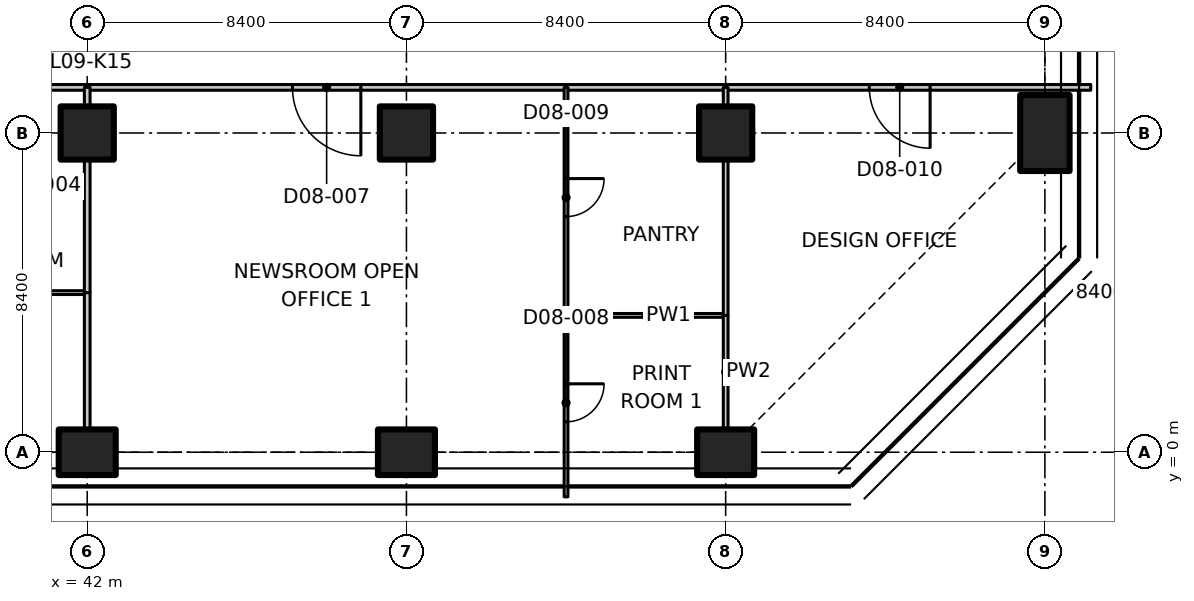
"""IFC4 building model, lengths in metres.
Left out: names, types, materials, properties, quantities, classifications, styles, units other than length and angle.
Written with IfcOpenShell. Run it as: python <this file> out.ifc"""

import sys

from ifc_helpers import new_model, si_unit, direction, frame, frame_2d, origin, origin_2d, place, context, subcontext, project, spatial, polyline, rectangle, outline, extrude, element, fill, save


model = new_model("IFC4")
c1 = context("Model", 3, precision=1e-05, world=origin(), true_north=direction((0.0, 1.0)))
c2 = subcontext(c1, "Body", "Model", "MODEL_VIEW")
j1 = project(units=[si_unit("LENGTHUNIT", "METRE"), si_unit("PLANEANGLEUNIT", "RADIAN")], contexts=[c1])
p1 = place(None, origin())
s1 = spatial("IfcSite", under=j1, at=p1, CompositionType="ELEMENT")
p2 = place(p1, origin())
s2 = spatial("IfcBuilding", under=s1, at=p2, CompositionType="ELEMENT")
p3 = place(p2, frame((0.0, 0.0, 47.3)))
s3 = spatial("IfcBuildingStorey", under=s2, at=p3, CompositionType="ELEMENT", Elevation=47.3)
p4 = place(p3, frame((42.0, 0.0, 0.0), z_axis=(0.0, 0.0, 1.0), x_axis=(0.0, 1.0, 0.0)))
e1 = element("IfcColumn", 1, at=p4, inside=s3, PredefinedType="COLUMN", context=c2, shape_type="SweptSolid", body=[
    extrude(rectangle(XDim=1.2, YDim=1.5, at=origin_2d()), origin(), (0.0, 0.0, 1.0), 3.35),
])
p5 = place(p3, frame((42.0, 8.4, 0.0), z_axis=(0.0, 0.0, 1.0), x_axis=(1.0, 0.0, 0.0)))
e2 = element("IfcColumn", 2, at=p5, inside=s3, PredefinedType="COLUMN", context=c2, shape_type="SweptSolid", body=[
    extrude(rectangle(XDim=1.4, YDim=1.4, at=origin_2d()), origin(), (0.0, 0.0, 1.0), 3.35),
])
p6 = place(p3, frame((50.4, 0.0, 0.0), z_axis=(0.0, 0.0, 1.0), x_axis=(0.0, 1.0, 0.0)))
e3 = element("IfcColumn", 3, at=p6, inside=s3, PredefinedType="COLUMN", context=c2, shape_type="SweptSolid", body=[
    extrude(rectangle(XDim=1.2, YDim=1.5, at=origin_2d()), origin(), (0.0, 0.0, 1.0), 3.35),
])
p7 = place(p3, frame((50.4, 8.4, 0.0), z_axis=(0.0, 0.0, 1.0), x_axis=(1.0, 0.0, 0.0)))
e4 = element("IfcColumn", 4, at=p7, inside=s3, PredefinedType="COLUMN", context=c2, shape_type="SweptSolid", body=[
    extrude(rectangle(XDim=1.4, YDim=1.4, at=origin_2d()), origin(), (0.0, 0.0, 1.0), 3.35),
])
p8 = place(p3, frame((58.8, 0.0, 0.0), z_axis=(0.0, 0.0, 1.0), x_axis=(0.0, 1.0, 0.0)))
e5 = element("IfcColumn", 5, at=p8, inside=s3, PredefinedType="COLUMN", context=c2, shape_type="SweptSolid", body=[
    extrude(rectangle(XDim=1.2, YDim=1.5, at=origin_2d()), origin(), (0.0, 0.0, 1.0), 3.35),
])
p9 = place(p3, frame((58.8, 8.4, 0.0), z_axis=(0.0, 0.0, 1.0), x_axis=(1.0, 0.0, 0.0)))
e6 = element("IfcColumn", 6, at=p9, inside=s3, PredefinedType="COLUMN", context=c2, shape_type="SweptSolid", body=[
    extrude(rectangle(XDim=1.4, YDim=1.4, at=origin_2d()), origin(), (0.0, 0.0, 1.0), 3.35),
])
p10 = place(p3, frame((67.2, 8.4, 0.0), z_axis=(0.0, 0.0, 1.0), x_axis=(1.0, 0.0, 0.0)))
e7 = element("IfcColumn", 7, at=p10, inside=s3, PredefinedType="COLUMN", context=c2, shape_type="SweptSolid", body=[
    extrude(rectangle(XDim=1.3, YDim=2.0, at=origin_2d()), origin(), (0.0, 0.0, 1.0), 3.35),
])
p11 = place(p3, frame((42.0, 9.6, 0.0), z_axis=(0.0, 0.0, 1.0), x_axis=(-1.0, 0.0, 0.0)))
e8 = element("IfcWall", 8, at=p11, inside=s3, PredefinedType="PARTITIONING", context=c2, shape_type="SweptSolid", body=[
    extrude(rectangle(XDim=4.2, YDim=0.15, at=frame_2d((2.1, 0.0))), origin(), (0.0, 0.0, 1.0), 3.33),
])
p12 = place(p3, frame((54.6, 9.6, 0.0), z_axis=(0.0, 0.0, 1.0), x_axis=(-1.0, 0.0, 0.0)))
e9 = element("IfcWall", 9, at=p12, inside=s3, PredefinedType="PARTITIONING", context=c2, shape_type="SweptSolid", body=[
    extrude(rectangle(XDim=12.6, YDim=0.15, at=frame_2d((6.3, 0.0))), origin(), (0.0, 0.0, 1.0), 3.33),
])
p13 = place(p12, frame((5.4, 0.0, 0.0)))
e10 = element("IfcOpeningElement", 10, at=p13, cuts=e9, PredefinedType="OPENING", context=c2, shape_type="SweptSolid", body=[
    extrude(rectangle(XDim=1.8, YDim=2.1, at=frame_2d((0.9, 1.05))), frame((0.0, 0.085, 0.0), z_axis=(0.0, -1.0, 0.0), x_axis=(1.0, 0.0, 0.0)), (0.0, 0.0, 1.0), 0.17),
])
p14 = place(p3, frame((58.8, 9.6, 0.0), z_axis=(0.0, 0.0, 1.0), x_axis=(-1.0, 0.0, 0.0)))
e11 = element("IfcWall", 11, at=p14, inside=s3, PredefinedType="PARTITIONING", context=c2, shape_type="SweptSolid", body=[
    extrude(rectangle(XDim=4.2, YDim=0.15, at=frame_2d((2.1, 0.0))), origin(), (0.0, 0.0, 1.0), 3.33),
])
p15 = place(p3, frame((68.407, 9.6, 0.0), z_axis=(0.0, 0.0, 1.0), x_axis=(-1.0, 0.0, 0.0)))
e12 = element("IfcWall", 12, at=p15, inside=s3, PredefinedType="PARTITIONING", context=c2, shape_type="SweptSolid", body=[
    extrude(outline(polyline([(0.0, 0.0), (9.607, 0.0), (9.607, 3.33), (1.657, 3.33), (1.655, 2.98), (0.759, 2.98), (0.757, 3.33), (0.127, 3.33), (0.0, 3.33), (0.0, 0.0)])), frame((0.0, 0.075, 0.0), z_axis=(0.0, -1.0, 0.0), x_axis=(1.0, 0.0, 0.0)), (0.0, 0.0, 1.0), 0.15),
])
p16 = place(p15, frame((4.227, 0.0, 0.0)))
e13 = element("IfcOpeningElement", 13, at=p16, cuts=e12, PredefinedType="OPENING", context=c2, shape_type="SweptSolid", body=[
    extrude(rectangle(XDim=1.6, YDim=2.1, at=frame_2d((0.8, 1.05))), frame((0.0, 0.085, 0.0), z_axis=(0.0, -1.0, 0.0), x_axis=(1.0, 0.0, 0.0)), (0.0, 0.0, 1.0), 0.17),
])
p17 = place(p3, frame((37.8, 4.2, 0.0), z_axis=(0.0, 0.0, 1.0), x_axis=(1.0, 0.0, 0.0)))
e14 = element("IfcWall", 14, at=p17, inside=s3, PredefinedType="PARTITIONING", context=c2, shape_type="SweptSolid", body=[
    extrude(rectangle(XDim=4.2, YDim=0.1, at=frame_2d((2.1, 0.0))), origin(), (0.0, 0.0, 1.0), 3.33),
])
p18 = place(p3, frame((42.0, 4.2, 0.0), z_axis=(0.0, 0.0, 1.0), x_axis=(0.0, -1.0, 0.0)))
e15 = element("IfcWall", 15, at=p18, inside=s3, PredefinedType="PARTITIONING", context=c2, shape_type="SweptSolid", body=[
    extrude(rectangle(XDim=3.58, YDim=0.15, at=frame_2d((1.79, 0.0))), origin(), (0.0, 0.0, 1.0), 3.33),
])
p19 = place(p3, frame((42.0, 9.6, 0.0), z_axis=(0.0, 0.0, 1.0), x_axis=(0.0, -1.0, 0.0)))
e16 = element("IfcWall", 16, at=p19, inside=s3, PredefinedType="PARTITIONING", context=c2, shape_type="SweptSolid", body=[
    extrude(rectangle(XDim=0.48, YDim=0.15, at=frame_2d((0.24, 0.0))), origin(), (0.0, 0.0, 1.0), 3.33),
])
p20 = place(p3, frame((42.0, 7.68, 0.0), z_axis=(0.0, 0.0, 1.0), x_axis=(0.0, -1.0, 0.0)))
e17 = element("IfcWall", 17, at=p20, inside=s3, PredefinedType="PARTITIONING", context=c2, shape_type="SweptSolid", body=[
    extrude(rectangle(XDim=3.48, YDim=0.15, at=frame_2d((1.74, 0.0))), origin(), (0.0, 0.0, 1.0), 3.33),
])
p21 = place(p3, frame((54.6, 3.6, 0.0), z_axis=(0.0, 0.0, 1.0), x_axis=(0.0, -1.0, 0.0)))
e18 = element("IfcWall", 18, at=p21, inside=s3, PredefinedType="PARTITIONING", context=c2, shape_type="SweptSolid", body=[
    extrude(outline(polyline([(0.0, 0.0), (4.774, 0.0), (4.774, 3.33), (4.7, 3.33), (4.05, 3.33), (4.048, 2.98), (3.152, 2.98), (3.15, 3.33), (0.0, 3.33), (0.0, 0.0)])), frame((0.0, 0.05, 0.0), z_axis=(0.0, -1.0, 0.0), x_axis=(1.0, 0.0, 0.0)), (0.0, 0.0, 1.0), 0.1),
])
p22 = place(p21, frame((1.8, 0.0, 0.0)))
e19 = element("IfcOpeningElement", 19, at=p22, cuts=e18, PredefinedType="OPENING", context=c2, shape_type="SweptSolid", body=[
    extrude(rectangle(XDim=1.0, YDim=2.1, at=frame_2d((0.5, 1.05))), frame((0.0, 0.06, 0.0), z_axis=(0.0, -1.0, 0.0), x_axis=(1.0, 0.0, 0.0)), (0.0, 0.0, 1.0), 0.12),
])
p23 = place(p3, frame((54.6, 9.6, 0.0), z_axis=(0.0, 0.0, 1.0), x_axis=(0.0, -1.0, 0.0)))
e20 = element("IfcWall", 20, at=p23, inside=s3, PredefinedType="PARTITIONING", context=c2, shape_type="SweptSolid", body=[
    extrude(rectangle(XDim=6.0, YDim=0.1, at=frame_2d((3.0, 0.0))), origin(), (0.0, 0.0, 1.0), 3.33),
])
p24 = place(p23, frame((2.4, 0.0, 0.0)))
e21 = element("IfcOpeningElement", 21, at=p24, cuts=e20, PredefinedType="OPENING", context=c2, shape_type="SweptSolid", body=[
    extrude(rectangle(XDim=1.0, YDim=2.1, at=frame_2d((0.5, 1.05))), frame((0.0, 0.06, 0.0), z_axis=(0.0, -1.0, 0.0), x_axis=(1.0, 0.0, 0.0)), (0.0, 0.0, 1.0), 0.12),
])
p25 = place(p3, frame((54.6, 3.6, 0.0), z_axis=(0.0, 0.0, 1.0), x_axis=(1.0, 0.0, 0.0)))
e22 = element("IfcWall", 22, at=p25, inside=s3, PredefinedType="PARTITIONING", context=c2, shape_type="SweptSolid", body=[
    extrude(rectangle(XDim=4.2, YDim=0.1, at=frame_2d((2.1, 0.0))), origin(), (0.0, 0.0, 1.0), 3.33),
])
p26 = place(p3, frame((58.8, 3.6, 0.0), z_axis=(0.0, 0.0, 1.0), x_axis=(0.0, -1.0, 0.0)))
e23 = element("IfcWall", 23, at=p26, inside=s3, PredefinedType="PARTITIONING", context=c2, shape_type="SweptSolid", body=[
    extrude(rectangle(XDim=2.98, YDim=0.125, at=frame_2d((1.49, 0.0))), origin(), (0.0, 0.0, 1.0), 3.33),
])
p27 = place(p3, frame((58.8, 9.6, 0.0), z_axis=(0.0, 0.0, 1.0), x_axis=(0.0, -1.0, 0.0)))
e24 = element("IfcWall", 24, at=p27, inside=s3, PredefinedType="PARTITIONING", context=c2, shape_type="SweptSolid", body=[
    extrude(rectangle(XDim=0.48, YDim=0.125, at=frame_2d((0.24, 0.0))), origin(), (0.0, 0.0, 1.0), 3.33),
])
p28 = place(p3, frame((58.8, 7.68, 0.0), z_axis=(0.0, 0.0, 1.0), x_axis=(0.0, -1.0, 0.0)))
e25 = element("IfcWall", 25, at=p28, inside=s3, PredefinedType="PARTITIONING", context=c2, shape_type="SweptSolid", body=[
    extrude(rectangle(XDim=4.08, YDim=0.125, at=frame_2d((2.04, 0.0))), origin(), (0.0, 0.0, 1.0), 3.33),
])
p29 = place(p13, origin())
e26 = element("IfcDoor", 26, at=p29, inside=s3, OperationType="DOUBLE_DOOR_SINGLE_SWING", PredefinedType="DOOR", context=c2, shape_type="SweptSolid", body=[
    extrude(rectangle(XDim=1.8, YDim=2.1, at=frame_2d((0.9, 1.05))), frame((0.0, 0.025, 0.0), z_axis=(0.0, -1.0, 0.0), x_axis=(1.0, 0.0, 0.0)), (0.0, 0.0, 1.0), 0.05),
])
fill(e10, e26)
p30 = place(p22, origin())
e27 = element("IfcDoor", 27, at=p30, inside=s3, OperationType="SINGLE_SWING_LEFT", PredefinedType="DOOR", context=c2, shape_type="SweptSolid", body=[
    extrude(rectangle(XDim=1.0, YDim=2.1, at=frame_2d((0.5, 1.05))), frame((0.0, 0.025, 0.0), z_axis=(0.0, -1.0, 0.0), x_axis=(1.0, 0.0, 0.0)), (0.0, 0.0, 1.0), 0.05),
])
fill(e19, e27)
p31 = place(p24, origin())
e28 = element("IfcDoor", 28, at=p31, inside=s3, OperationType="SINGLE_SWING_LEFT", PredefinedType="DOOR", context=c2, shape_type="SweptSolid", body=[
    extrude(rectangle(XDim=1.0, YDim=2.1, at=frame_2d((0.5, 1.05))), frame((0.0, 0.025, 0.0), z_axis=(0.0, -1.0, 0.0), x_axis=(1.0, 0.0, 0.0)), (0.0, 0.0, 1.0), 0.05),
])
fill(e21, e28)
p32 = place(p16, origin())
e29 = element("IfcDoor", 29, at=p32, inside=s3, OperationType="DOUBLE_DOOR_SINGLE_SWING", PredefinedType="DOOR", context=c2, shape_type="SweptSolid", body=[
    extrude(rectangle(XDim=1.6, YDim=2.1, at=frame_2d((0.8, 1.05))), frame((0.0, 0.025, 0.0), z_axis=(0.0, -1.0, 0.0), x_axis=(1.0, 0.0, 0.0)), (0.0, 0.0, 1.0), 0.05),
])
fill(e13, e29)
save(model, sys.argv[1])
